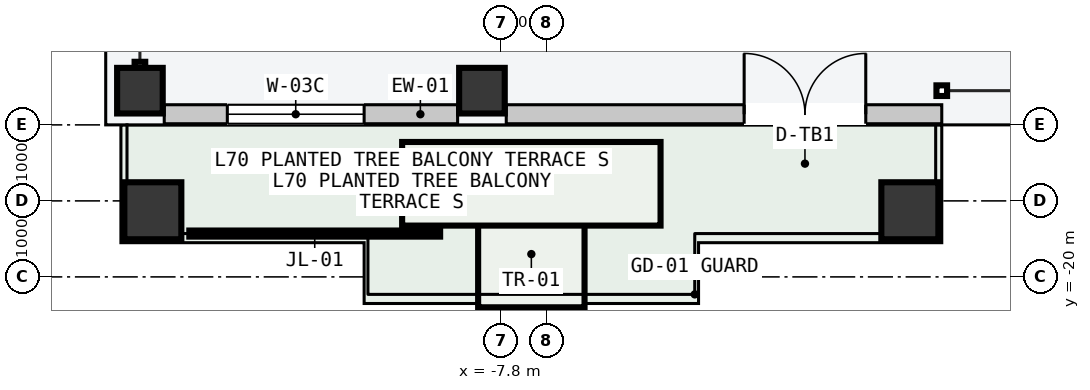
"""IFC4 building model, lengths in metres.
Left out: names, types, materials, properties, quantities, classifications, styles, units other than length and angle.
Written with IfcOpenShell. Run it as: python <this file> out.ifc"""

import sys

from ifc_helpers import new_model, si_unit, direction, frame, frame_2d, origin, origin_2d, place, context, subcontext, project, spatial, rectangle, hollow_rectangle, extrude, element, fill, save


model = new_model("IFC4")
c1 = context("Model", 3, precision=1e-05, world=origin(), true_north=direction((0.0, 1.0)))
c2 = subcontext(c1, "Body", "Model", "MODEL_VIEW")
j1 = project(units=[si_unit("LENGTHUNIT", "METRE"), si_unit("PLANEANGLEUNIT", "RADIAN")], contexts=[c1])
p1 = place(None, origin())
s1 = spatial("IfcSite", under=j1, at=p1, CompositionType="ELEMENT")
p2 = place(p1, origin())
s2 = spatial("IfcBuilding", under=s1, at=p2, CompositionType="ELEMENT")
p3 = place(p2, frame((0.0, 0.0, 265.2)))
s3 = spatial("IfcBuildingStorey", under=s2, at=p3, CompositionType="ELEMENT", Elevation=265.2)
for number, where, z_axis, x_axis in (
    (1, (-12.55, -17.55, 0.0), (0.0, 0.0, 1.0), (1.0, 0.0, 0.0)),
    (2, (-8.05, -17.55, 0.0), (0.0, 0.0, 1.0), (1.0, 0.0, 0.0)),
):
    element("IfcColumn", number, at=place(p3, frame(where, z_axis=z_axis, x_axis=x_axis)), inside=s3, PredefinedType="COLUMN", context=c2, shape_type="SweptSolid", body=[
        extrude(hollow_rectangle(XDim=0.6, YDim=0.6, WallThickness=0.025, at=origin_2d()), origin(), (0.0, 0.0, 1.0), 3.6),
    ])
for number, where, z_axis, x_axis in (
    (3, (-12.38, -19.13, 0.0), (0.0, 0.0, 1.0), (1.0, 0.0, 0.0)),
    (4, (-2.42, -19.13, 0.0), (0.0, 0.0, 1.0), (1.0, 0.0, 0.0)),
):
    element("IfcColumn", number, at=place(p3, frame(where, z_axis=z_axis, x_axis=x_axis)), inside=s3, PredefinedType="COLUMN", context=c2, shape_type="SweptSolid", body=[
        extrude(hollow_rectangle(XDim=0.75, YDim=0.75, WallThickness=0.032, at=origin_2d()), origin(), (0.0, 0.0, 1.0), 3.6),
    ])
p4 = place(p3, frame((-12.23, -17.86, 0.0), z_axis=(0.0, 0.0, 1.0), x_axis=(1.0, 0.0, 0.0)))
e5 = element("IfcWall", 5, at=p4, inside=s3, PredefinedType="STANDARD", context=c2, shape_type="SweptSolid", body=[
    extrude(rectangle(XDim=3.86, YDim=0.25, at=frame_2d((1.93, 0.0))), origin(), (0.0, 0.0, 1.0), 3.4),
])
p5 = place(p4, frame((0.83, 0.0, 0.85)))
e6 = element("IfcOpeningElement", 6, at=p5, cuts=e5, PredefinedType="OPENING", context=c2, shape_type="SweptSolid", body=[
    extrude(rectangle(XDim=1.8, YDim=2.05, at=frame_2d((0.9, 1.025))), frame((0.0, 0.135, 0.0), z_axis=(0.0, -1.0, 0.0), x_axis=(1.0, 0.0, 0.0)), (0.0, 0.0, 1.0), 0.27),
])
p6 = place(p3, frame((-7.73, -17.86, 0.0), z_axis=(0.0, 0.0, 1.0), x_axis=(1.0, 0.0, 0.0)))
e7 = element("IfcWall", 7, at=p6, inside=s3, PredefinedType="STANDARD", context=c2, shape_type="SweptSolid", body=[
    extrude(rectangle(XDim=5.73, YDim=0.25, at=frame_2d((2.865, 0.0))), origin(), (0.0, 0.0, 1.0), 3.4),
])
p7 = place(p6, frame((3.13, 0.0, 0.0)))
e8 = element("IfcOpeningElement", 8, at=p7, cuts=e7, PredefinedType="OPENING", context=c2, shape_type="SweptSolid", body=[
    extrude(rectangle(XDim=1.6, YDim=2.2, at=frame_2d((0.8, 1.1))), frame((0.0, 0.135, 0.0), z_axis=(0.0, -1.0, 0.0), x_axis=(1.0, 0.0, 0.0)), (0.0, 0.0, 1.0), 0.27),
])
p8 = place(p5, origin())
e9 = element("IfcWindow", 9, at=p8, inside=s3, PartitioningType="SINGLE_PANEL", PredefinedType="WINDOW", context=c2, shape_type="SweptSolid", body=[
    extrude(rectangle(XDim=1.8, YDim=2.05, at=frame_2d((0.9, 1.025))), frame((0.0, 0.03, 0.0), z_axis=(0.0, -1.0, 0.0), x_axis=(1.0, 0.0, 0.0)), (0.0, 0.0, 1.0), 0.06),
])
fill(e6, e9)
p9 = place(p7, origin())
e10 = element("IfcDoor", 10, at=p9, inside=s3, OperationType="DOUBLE_DOOR_SINGLE_SWING", PredefinedType="DOOR", context=c2, shape_type="SweptSolid", body=[
    extrude(rectangle(XDim=1.6, YDim=2.2, at=frame_2d((0.8, 1.1))), frame((0.0, 0.025, 0.0), z_axis=(0.0, -1.0, 0.0), x_axis=(1.0, 0.0, 0.0)), (0.0, 0.0, 1.0), 0.05),
])
fill(e8, e10)
save(model, sys.argv[1])
